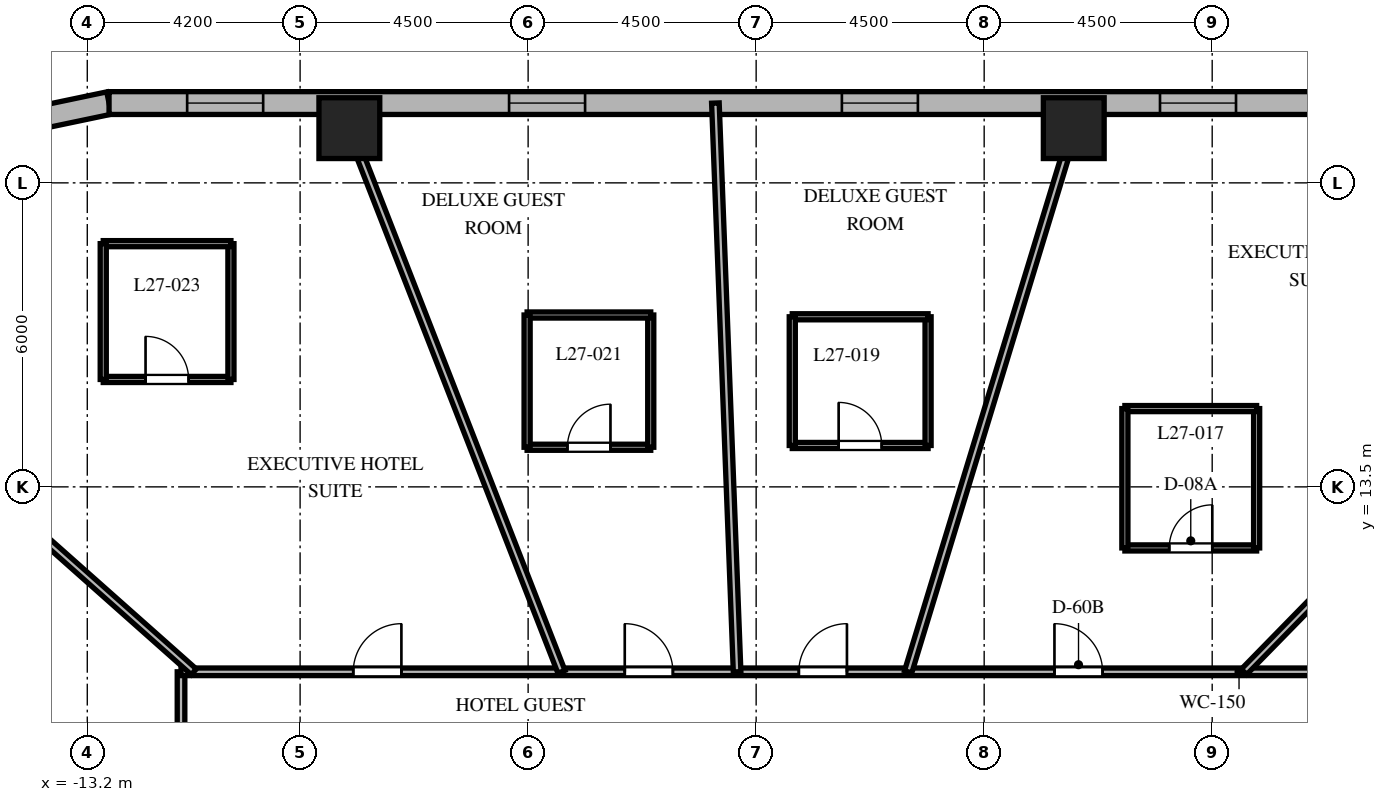
"""IFC4 building model, lengths in metres.
Left out: names, types, materials, properties, quantities, classifications, styles, units other than length and angle.
Written with IfcOpenShell. Run it as: python <this file> out.ifc"""

import sys

from ifc_helpers import new_model, si_unit, direction, frame, frame_2d, origin, origin_2d, place, context, subcontext, project, spatial, rectangle, extrude, element, fill, save


model = new_model("IFC4")
c1 = context("Model", 3, precision=1e-05, world=origin(), true_north=direction((0.0, 1.0)))
c2 = subcontext(c1, "Body", "Model", "MODEL_VIEW")
j1 = project(units=[si_unit("LENGTHUNIT", "METRE"), si_unit("PLANEANGLEUNIT", "RADIAN")], contexts=[c1])
p1 = place(None, origin())
s1 = spatial("IfcSite", under=j1, at=p1, CompositionType="ELEMENT")
p2 = place(p1, origin())
s2 = spatial("IfcBuilding", under=s1, at=p2, CompositionType="ELEMENT")
p3 = place(p2, frame((0.0, 0.0, 113.6)))
s3 = spatial("IfcBuildingStorey", under=s2, at=p3, CompositionType="ELEMENT", Elevation=113.6)
for number, where, z_axis, x_axis in (
    (1, (6.268, 20.58, 0.0), (0.0, 0.0, 1.0), (1.0, 0.0, 0.0)),
    (2, (-8.028, 20.58, 0.0), (0.0, 0.0, 1.0), (1.0, 0.0, 0.0)),
):
    element("IfcColumn", number, at=place(p3, frame(where, z_axis=z_axis, x_axis=x_axis)), inside=s3, PredefinedType="COLUMN", context=c2, shape_type="SweptSolid", body=[
        extrude(rectangle(XDim=1.2, YDim=1.2, at=origin_2d()), origin(), (0.0, 0.0, 1.0), 3.7),
    ])
p4 = place(p3, frame((-12.771, 21.075, 0.0), z_axis=(0.0, 0.0, 1.0), x_axis=(-0.97874281988, -0.205091424819, 0.0)))
e3 = element("IfcWall", 3, at=p4, inside=s3, PredefinedType="SOLIDWALL", context=c2, shape_type="SweptSolid", body=[
    extrude(rectangle(XDim=1.406, YDim=0.45, at=frame_2d((0.703, 0.0))), origin(), (0.0, 0.0, 1.0), 3.4),
])
p5 = place(p3, frame((11.012, 21.075, 0.0), z_axis=(0.0, 0.0, 1.0), x_axis=(-1.0, 0.0, 0.0)))
e4 = element("IfcWall", 4, at=p5, inside=s3, PredefinedType="SOLIDWALL", context=c2, shape_type="SweptSolid", body=[
    extrude(rectangle(XDim=23.782, YDim=0.45, at=frame_2d((11.891, 0.0))), origin(), (0.0, 0.0, 1.0), 3.4),
])
p6 = place(p5, frame((1.542, 0.0, 0.8)))
e5 = element("IfcOpeningElement", 5, at=p6, cuts=e4, PredefinedType="OPENING", context=c2, shape_type="SweptSolid", body=[
    extrude(rectangle(XDim=1.5, YDim=1.8, at=frame_2d((0.75, 0.9))), frame((0.0, 0.235, 0.0), z_axis=(0.0, -1.0, 0.0), x_axis=(1.0, 0.0, 0.0)), (0.0, 0.0, 1.0), 0.47),
])
p7 = place(p5, frame((7.82, 0.0, 0.8)))
e6 = element("IfcOpeningElement", 6, at=p7, cuts=e4, PredefinedType="OPENING", context=c2, shape_type="SweptSolid", body=[
    extrude(rectangle(XDim=1.5, YDim=1.8, at=frame_2d((0.75, 0.9))), frame((0.0, 0.235, 0.0), z_axis=(0.0, -1.0, 0.0), x_axis=(1.0, 0.0, 0.0)), (0.0, 0.0, 1.0), 0.47),
])
p8 = place(p5, frame((14.388, 0.0, 0.8)))
e7 = element("IfcOpeningElement", 7, at=p8, cuts=e4, PredefinedType="OPENING", context=c2, shape_type="SweptSolid", body=[
    extrude(rectangle(XDim=1.5, YDim=1.8, at=frame_2d((0.75, 0.9))), frame((0.0, 0.235, 0.0), z_axis=(0.0, -1.0, 0.0), x_axis=(1.0, 0.0, 0.0)), (0.0, 0.0, 1.0), 0.47),
])
p9 = place(p5, frame((20.741, 0.0, 0.8)))
e8 = element("IfcOpeningElement", 8, at=p9, cuts=e4, PredefinedType="OPENING", context=c2, shape_type="SweptSolid", body=[
    extrude(rectangle(XDim=1.5, YDim=1.8, at=frame_2d((0.75, 0.9))), frame((0.0, 0.235, 0.0), z_axis=(0.0, -1.0, 0.0), x_axis=(1.0, 0.0, 0.0)), (0.0, 0.0, 1.0), 0.47),
])
p10 = place(p3, frame((-11.35, -9.85, 0.0), z_axis=(0.0, 0.0, 1.0), x_axis=(0.0, 1.0, 0.0)))
e9 = element("IfcWall", 9, at=p10, inside=s3, PredefinedType="PARTITIONING", context=c2, shape_type="SweptSolid", body=[
    extrude(rectangle(XDim=19.7, YDim=0.15, at=frame_2d((9.85, 0.0))), origin(), (0.0, 0.0, 1.0), 2.84),
])
p11 = place(p10, frame((17.197, 0.0, 0.0)))
e10 = element("IfcOpeningElement", 10, at=p11, cuts=e9, PredefinedType="OPENING", context=c2, shape_type="SweptSolid", body=[
    extrude(rectangle(XDim=0.9, YDim=2.03, at=frame_2d((0.45, 1.015))), frame((0.0, 0.085, 0.0), z_axis=(0.0, -1.0, 0.0), x_axis=(1.0, 0.0, 0.0)), (0.0, 0.0, 1.0), 0.17),
])
p12 = place(p10, frame((13.408, 0.0, 0.0)))
e11 = element("IfcOpeningElement", 11, at=p12, cuts=e9, PredefinedType="OPENING", context=c2, shape_type="SweptSolid", body=[
    extrude(rectangle(XDim=0.95, YDim=2.03, at=frame_2d((0.475, 1.015))), frame((0.0, 0.085, 0.0), z_axis=(0.0, -1.0, 0.0), x_axis=(1.0, 0.0, 0.0)), (0.0, 0.0, 1.0), 0.17),
])
p13 = place(p10, frame((8.836, 0.0, 0.0)))
e12 = element("IfcOpeningElement", 12, at=p13, cuts=e9, PredefinedType="OPENING", context=c2, shape_type="SweptSolid", body=[
    extrude(rectangle(XDim=0.95, YDim=2.03, at=frame_2d((0.475, 1.015))), frame((0.0, 0.085, 0.0), z_axis=(0.0, -1.0, 0.0), x_axis=(1.0, 0.0, 0.0)), (0.0, 0.0, 1.0), 0.17),
])
p14 = place(p10, frame((4.199, 0.0, 0.0)))
e13 = element("IfcOpeningElement", 13, at=p14, cuts=e9, PredefinedType="OPENING", context=c2, shape_type="SweptSolid", body=[
    extrude(rectangle(XDim=0.95, YDim=2.03, at=frame_2d((0.475, 1.015))), frame((0.0, 0.085, 0.0), z_axis=(0.0, -1.0, 0.0), x_axis=(1.0, 0.0, 0.0)), (0.0, 0.0, 1.0), 0.17),
])
p15 = place(p10, frame((1.002, 0.0, 0.0)))
e14 = element("IfcOpeningElement", 14, at=p15, cuts=e9, PredefinedType="OPENING", context=c2, shape_type="SweptSolid", body=[
    extrude(rectangle(XDim=0.9, YDim=2.03, at=frame_2d((0.45, 1.015))), frame((0.0, 0.085, 0.0), z_axis=(0.0, -1.0, 0.0), x_axis=(1.0, 0.0, 0.0)), (0.0, 0.0, 1.0), 0.17),
])
p16 = place(p3, frame((-11.35, 9.85, 0.0), z_axis=(0.0, 0.0, 1.0), x_axis=(1.0, 0.0, 0.0)))
e15 = element("IfcWall", 15, at=p16, inside=s3, PredefinedType="PARTITIONING", context=c2, shape_type="SweptSolid", body=[
    extrude(rectangle(XDim=22.7, YDim=0.15, at=frame_2d((11.35, 0.0))), origin(), (0.0, 0.0, 1.0), 2.84),
])
p17 = place(p16, frame((17.237, 0.0, 0.0)))
e16 = element("IfcOpeningElement", 16, at=p17, cuts=e15, PredefinedType="OPENING", context=c2, shape_type="SweptSolid", body=[
    extrude(rectangle(XDim=0.95, YDim=2.03, at=frame_2d((0.475, 1.015))), frame((0.0, 0.085, 0.0), z_axis=(0.0, -1.0, 0.0), x_axis=(1.0, 0.0, 0.0)), (0.0, 0.0, 1.0), 0.17),
])
p18 = place(p16, frame((12.192, 0.0, 0.0)))
e17 = element("IfcOpeningElement", 17, at=p18, cuts=e15, PredefinedType="OPENING", context=c2, shape_type="SweptSolid", body=[
    extrude(rectangle(XDim=0.95, YDim=2.03, at=frame_2d((0.475, 1.015))), frame((0.0, 0.085, 0.0), z_axis=(0.0, -1.0, 0.0), x_axis=(1.0, 0.0, 0.0)), (0.0, 0.0, 1.0), 0.17),
])
p19 = place(p16, frame((8.757, 0.0, 0.0)))
e18 = element("IfcOpeningElement", 18, at=p19, cuts=e15, PredefinedType="OPENING", context=c2, shape_type="SweptSolid", body=[
    extrude(rectangle(XDim=0.95, YDim=2.03, at=frame_2d((0.475, 1.015))), frame((0.0, 0.085, 0.0), z_axis=(0.0, -1.0, 0.0), x_axis=(1.0, 0.0, 0.0)), (0.0, 0.0, 1.0), 0.17),
])
p20 = place(p16, frame((3.399, 0.0, 0.0)))
e19 = element("IfcOpeningElement", 19, at=p20, cuts=e15, PredefinedType="OPENING", context=c2, shape_type="SweptSolid", body=[
    extrude(rectangle(XDim=0.95, YDim=2.03, at=frame_2d((0.475, 1.015))), frame((0.0, 0.085, 0.0), z_axis=(0.0, -1.0, 0.0), x_axis=(1.0, 0.0, 0.0)), (0.0, 0.0, 1.0), 0.17),
])
p21 = place(p3, frame((9.628, 9.85, 0.0), z_axis=(0.0, 0.0, 1.0), x_axis=(0.698992824326, 0.715128681805, 0.0)))
e20 = element("IfcWall", 20, at=p21, inside=s3, PredefinedType="PARTITIONING", context=c2, shape_type="SweptSolid", body=[
    extrude(rectangle(XDim=8.579, YDim=0.15, at=frame_2d((4.29, 0.0))), origin(), (0.0, 0.0, 1.0), 2.54),
])
p22 = place(p3, frame((3.0, 9.85, 0.0), z_axis=(0.0, 0.0, 1.0), x_axis=(0.291352035382, 0.95661590593, 0.0)))
e21 = element("IfcWall", 21, at=p22, inside=s3, PredefinedType="PARTITIONING", context=c2, shape_type="SweptSolid", body=[
    extrude(rectangle(XDim=11.734, YDim=0.15, at=frame_2d((5.867, 0.0))), origin(), (0.0, 0.0, 1.0), 2.54),
])
p23 = place(p3, frame((-0.376, 9.85, 0.0), z_axis=(0.0, 0.0, 1.0), x_axis=(-0.03812177869, 0.999273100804, 0.0)))
e22 = element("IfcWall", 22, at=p23, inside=s3, PredefinedType="PARTITIONING", context=c2, shape_type="SweptSolid", body=[
    extrude(rectangle(XDim=11.233, YDim=0.15, at=frame_2d((5.616, 0.0))), origin(), (0.0, 0.0, 1.0), 2.54),
])
p24 = place(p3, frame((-3.842, 9.85, 0.0), z_axis=(0.0, 0.0, 1.0), x_axis=(-0.363432685593, 0.931620460833, 0.0)))
e23 = element("IfcWall", 23, at=p24, inside=s3, PredefinedType="PARTITIONING", context=c2, shape_type="SweptSolid", body=[
    extrude(rectangle(XDim=12.049, YDim=0.15, at=frame_2d((6.024, 0.0))), origin(), (0.0, 0.0, 1.0), 2.54),
])
p25 = place(p3, frame((-11.098, 9.85, 0.0), z_axis=(0.0, 0.0, 1.0), x_axis=(-0.747904295103, 0.663806572253, 0.0)))
e24 = element("IfcWall", 24, at=p25, inside=s3, PredefinedType="PARTITIONING", context=c2, shape_type="SweptSolid", body=[
    extrude(rectangle(XDim=8.16, YDim=0.15, at=frame_2d((4.08, 0.0))), origin(), (0.0, 0.0, 1.0), 2.54),
])
p26 = place(p3, frame((-11.35, 5.983, 0.0), z_axis=(0.0, 0.0, 1.0), x_axis=(-0.884597447182, 0.466355397137, 0.0)))
e25 = element("IfcWall", 25, at=p26, inside=s3, PredefinedType="PARTITIONING", context=c2, shape_type="SweptSolid", body=[
    extrude(rectangle(XDim=8.657, YDim=0.15, at=frame_2d((4.328, 0.0))), origin(), (0.0, 0.0, 1.0), 2.54),
])
p27 = place(p3, frame((7.277, 12.295, 0.0), z_axis=(0.0, 0.0, 1.0), x_axis=(1.0, 0.0, 0.0)))
e26 = element("IfcWall", 26, at=p27, inside=s3, PredefinedType="PARTITIONING", context=c2, shape_type="SweptSolid", body=[
    extrude(rectangle(XDim=2.6, YDim=0.12, at=frame_2d((1.3, 0.0))), origin(), (0.0, 0.0, 1.0), 2.84),
])
p28 = place(p27, frame((0.875, 0.0, 0.0)))
e27 = element("IfcOpeningElement", 27, at=p28, cuts=e26, PredefinedType="OPENING", context=c2, shape_type="SweptSolid", body=[
    extrude(rectangle(XDim=0.85, YDim=2.03, at=frame_2d((0.425, 1.015))), frame((0.0, 0.07, 0.0), z_axis=(0.0, -1.0, 0.0), x_axis=(1.0, 0.0, 0.0)), (0.0, 0.0, 1.0), 0.14),
])
p29 = place(p3, frame((9.877, 12.295, 0.0), z_axis=(0.0, 0.0, 1.0), x_axis=(0.0, 1.0, 0.0)))
e28 = element("IfcWall", 28, at=p29, inside=s3, PredefinedType="PARTITIONING", context=c2, shape_type="SweptSolid", body=[
    extrude(rectangle(XDim=2.75, YDim=0.12, at=frame_2d((1.375, 0.0))), origin(), (0.0, 0.0, 1.0), 2.972),
])
p30 = place(p3, frame((9.877, 15.045, 0.0), z_axis=(0.0, 0.0, 1.0), x_axis=(-1.0, 0.0, 0.0)))
e29 = element("IfcWall", 29, at=p30, inside=s3, PredefinedType="PARTITIONING", context=c2, shape_type="SweptSolid", body=[
    extrude(rectangle(XDim=2.6, YDim=0.12, at=frame_2d((1.3, 0.0))), origin(), (0.0, 0.0, 1.0), 2.972),
])
p31 = place(p3, frame((7.277, 15.045, 0.0), z_axis=(0.0, 0.0, 1.0), x_axis=(0.0, -1.0, 0.0)))
e30 = element("IfcWall", 30, at=p31, inside=s3, PredefinedType="PARTITIONING", context=c2, shape_type="SweptSolid", body=[
    extrude(rectangle(XDim=2.75, YDim=0.12, at=frame_2d((1.375, 0.0))), origin(), (0.0, 0.0, 1.0), 2.84),
])
p32 = place(p3, frame((0.713, 14.317, 0.0), z_axis=(0.0, 0.0, 1.0), x_axis=(1.0, 0.0, 0.0)))
e31 = element("IfcWall", 31, at=p32, inside=s3, PredefinedType="PARTITIONING", context=c2, shape_type="SweptSolid", body=[
    extrude(rectangle(XDim=2.68, YDim=0.12, at=frame_2d((1.34, 0.0))), origin(), (0.0, 0.0, 1.0), 3.4),
])
p33 = place(p32, frame((0.915, 0.0, 0.0)))
e32 = element("IfcOpeningElement", 32, at=p33, cuts=e31, PredefinedType="OPENING", context=c2, shape_type="SweptSolid", body=[
    extrude(rectangle(XDim=0.85, YDim=2.03, at=frame_2d((0.425, 1.015))), frame((0.0, 0.07, 0.0), z_axis=(0.0, -1.0, 0.0), x_axis=(1.0, 0.0, 0.0)), (0.0, 0.0, 1.0), 0.14),
])
p34 = place(p3, frame((3.393, 14.317, 0.0), z_axis=(0.0, 0.0, 1.0), x_axis=(0.0, 1.0, 0.0)))
e33 = element("IfcWall", 33, at=p34, inside=s3, PredefinedType="PARTITIONING", context=c2, shape_type="SweptSolid", body=[
    extrude(rectangle(XDim=2.54, YDim=0.12, at=frame_2d((1.27, 0.0))), origin(), (0.0, 0.0, 1.0), 2.84),
])
p35 = place(p3, frame((3.393, 16.857, 0.0), z_axis=(0.0, 0.0, 1.0), x_axis=(-1.0, 0.0, 0.0)))
e34 = element("IfcWall", 34, at=p35, inside=s3, PredefinedType="PARTITIONING", context=c2, shape_type="SweptSolid", body=[
    extrude(rectangle(XDim=2.68, YDim=0.12, at=frame_2d((1.34, 0.0))), origin(), (0.0, 0.0, 1.0), 3.4),
])
p36 = place(p3, frame((0.713, 16.857, 0.0), z_axis=(0.0, 0.0, 1.0), x_axis=(0.0, -1.0, 0.0)))
e35 = element("IfcWall", 35, at=p36, inside=s3, PredefinedType="PARTITIONING", context=c2, shape_type="SweptSolid", body=[
    extrude(rectangle(XDim=2.54, YDim=0.12, at=frame_2d((1.27, 0.0))), origin(), (0.0, 0.0, 1.0), 2.84),
])
p37 = place(p3, frame((-4.52, 14.282, 0.0), z_axis=(0.0, 0.0, 1.0), x_axis=(1.0, 0.0, 0.0)))
e36 = element("IfcWall", 36, at=p37, inside=s3, PredefinedType="PARTITIONING", context=c2, shape_type="SweptSolid", body=[
    extrude(rectangle(XDim=2.44, YDim=0.12, at=frame_2d((1.22, 0.0))), origin(), (0.0, 0.0, 1.0), 3.4),
])
p38 = place(p37, frame((0.795, 0.0, 0.0)))
e37 = element("IfcOpeningElement", 37, at=p38, cuts=e36, PredefinedType="OPENING", context=c2, shape_type="SweptSolid", body=[
    extrude(rectangle(XDim=0.85, YDim=2.03, at=frame_2d((0.425, 1.015))), frame((0.0, 0.07, 0.0), z_axis=(0.0, -1.0, 0.0), x_axis=(1.0, 0.0, 0.0)), (0.0, 0.0, 1.0), 0.14),
])
p39 = place(p3, frame((-2.08, 14.282, 0.0), z_axis=(0.0, 0.0, 1.0), x_axis=(0.0, 1.0, 0.0)))
e38 = element("IfcWall", 38, at=p39, inside=s3, PredefinedType="PARTITIONING", context=c2, shape_type="SweptSolid", body=[
    extrude(rectangle(XDim=2.61, YDim=0.12, at=frame_2d((1.305, 0.0))), origin(), (0.0, 0.0, 1.0), 2.84),
])
p40 = place(p3, frame((-2.08, 16.892, 0.0), z_axis=(0.0, 0.0, 1.0), x_axis=(-1.0, 0.0, 0.0)))
e39 = element("IfcWall", 39, at=p40, inside=s3, PredefinedType="PARTITIONING", context=c2, shape_type="SweptSolid", body=[
    extrude(rectangle(XDim=2.44, YDim=0.12, at=frame_2d((1.22, 0.0))), origin(), (0.0, 0.0, 1.0), 3.4),
])
p41 = place(p3, frame((-4.52, 16.892, 0.0), z_axis=(0.0, 0.0, 1.0), x_axis=(0.0, -1.0, 0.0)))
e40 = element("IfcWall", 40, at=p41, inside=s3, PredefinedType="PARTITIONING", context=c2, shape_type="SweptSolid", body=[
    extrude(rectangle(XDim=2.61, YDim=0.12, at=frame_2d((1.305, 0.0))), origin(), (0.0, 0.0, 1.0), 2.84),
])
p42 = place(p3, frame((-12.885, 15.62, 0.0), z_axis=(0.0, 0.0, 1.0), x_axis=(1.0, 0.0, 0.0)))
e41 = element("IfcWall", 41, at=p42, inside=s3, PredefinedType="PARTITIONING", context=c2, shape_type="SweptSolid", body=[
    extrude(rectangle(XDim=2.52, YDim=0.12, at=frame_2d((1.26, 0.0))), origin(), (0.0, 0.0, 1.0), 3.4),
])
p43 = place(p42, frame((0.835, 0.0, 0.0)))
e42 = element("IfcOpeningElement", 42, at=p43, cuts=e41, PredefinedType="OPENING", context=c2, shape_type="SweptSolid", body=[
    extrude(rectangle(XDim=0.85, YDim=2.03, at=frame_2d((0.425, 1.015))), frame((0.0, 0.07, 0.0), z_axis=(0.0, -1.0, 0.0), x_axis=(1.0, 0.0, 0.0)), (0.0, 0.0, 1.0), 0.14),
])
p44 = place(p3, frame((-10.365, 15.62, 0.0), z_axis=(0.0, 0.0, 1.0), x_axis=(0.0, 1.0, 0.0)))
e43 = element("IfcWall", 43, at=p44, inside=s3, PredefinedType="PARTITIONING", context=c2, shape_type="SweptSolid", body=[
    extrude(rectangle(XDim=2.68, YDim=0.12, at=frame_2d((1.34, 0.0))), origin(), (0.0, 0.0, 1.0), 3.4),
])
p45 = place(p3, frame((-10.365, 18.3, 0.0), z_axis=(0.0, 0.0, 1.0), x_axis=(-1.0, 0.0, 0.0)))
e44 = element("IfcWall", 44, at=p45, inside=s3, PredefinedType="PARTITIONING", context=c2, shape_type="SweptSolid", body=[
    extrude(rectangle(XDim=2.52, YDim=0.12, at=frame_2d((1.26, 0.0))), origin(), (0.0, 0.0, 1.0), 2.54),
])
p46 = place(p3, frame((-12.885, 18.3, 0.0), z_axis=(0.0, 0.0, 1.0), x_axis=(0.0, -1.0, 0.0)))
e45 = element("IfcWall", 45, at=p46, inside=s3, PredefinedType="PARTITIONING", context=c2, shape_type="SweptSolid", body=[
    extrude(rectangle(XDim=2.68, YDim=0.12, at=frame_2d((1.34, 0.0))), origin(), (0.0, 0.0, 1.0), 2.54),
])
p47 = place(p6, origin())
e46 = element("IfcWindow", 46, at=p47, inside=s3, PartitioningType="SINGLE_PANEL", PredefinedType="WINDOW", context=c2, shape_type="SweptSolid", body=[
    extrude(rectangle(XDim=1.5, YDim=1.8, at=frame_2d((0.75, 0.9))), frame((0.0, 0.03, 0.0), z_axis=(0.0, -1.0, 0.0), x_axis=(1.0, 0.0, 0.0)), (0.0, 0.0, 1.0), 0.06),
])
fill(e5, e46)
p48 = place(p7, origin())
e47 = element("IfcWindow", 47, at=p48, inside=s3, PartitioningType="SINGLE_PANEL", PredefinedType="WINDOW", context=c2, shape_type="SweptSolid", body=[
    extrude(rectangle(XDim=1.5, YDim=1.8, at=frame_2d((0.75, 0.9))), frame((0.0, 0.03, 0.0), z_axis=(0.0, -1.0, 0.0), x_axis=(1.0, 0.0, 0.0)), (0.0, 0.0, 1.0), 0.06),
])
fill(e6, e47)
p49 = place(p8, origin())
e48 = element("IfcWindow", 48, at=p49, inside=s3, PartitioningType="SINGLE_PANEL", PredefinedType="WINDOW", context=c2, shape_type="SweptSolid", body=[
    extrude(rectangle(XDim=1.5, YDim=1.8, at=frame_2d((0.75, 0.9))), frame((0.0, 0.03, 0.0), z_axis=(0.0, -1.0, 0.0), x_axis=(1.0, 0.0, 0.0)), (0.0, 0.0, 1.0), 0.06),
])
fill(e7, e48)
p50 = place(p9, origin())
e49 = element("IfcWindow", 49, at=p50, inside=s3, PartitioningType="SINGLE_PANEL", PredefinedType="WINDOW", context=c2, shape_type="SweptSolid", body=[
    extrude(rectangle(XDim=1.5, YDim=1.8, at=frame_2d((0.75, 0.9))), frame((0.0, 0.03, 0.0), z_axis=(0.0, -1.0, 0.0), x_axis=(1.0, 0.0, 0.0)), (0.0, 0.0, 1.0), 0.06),
])
fill(e8, e49)
p51 = place(p17, origin())
e50 = element("IfcDoor", 50, at=p51, inside=s3, OperationType="SINGLE_SWING_LEFT", PredefinedType="DOOR", context=c2, shape_type="SweptSolid", body=[
    extrude(rectangle(XDim=0.95, YDim=2.03, at=frame_2d((0.475, 1.015))), frame((0.0, 0.025, 0.0), z_axis=(0.0, -1.0, 0.0), x_axis=(1.0, 0.0, 0.0)), (0.0, 0.0, 1.0), 0.05),
])
fill(e16, e50)
p52 = place(p28, origin())
e51 = element("IfcDoor", 51, at=p52, inside=s3, OperationType="SINGLE_SWING_RIGHT", PredefinedType="DOOR", context=c2, shape_type="SweptSolid", body=[
    extrude(rectangle(XDim=0.85, YDim=2.03, at=frame_2d((0.425, 1.015))), frame((0.0, 0.025, 0.0), z_axis=(0.0, -1.0, 0.0), x_axis=(1.0, 0.0, 0.0)), (0.0, 0.0, 1.0), 0.05),
])
fill(e27, e51)
p53 = place(p18, origin())
e52 = element("IfcDoor", 52, at=p53, inside=s3, OperationType="SINGLE_SWING_RIGHT", PredefinedType="DOOR", context=c2, shape_type="SweptSolid", body=[
    extrude(rectangle(XDim=0.95, YDim=2.03, at=frame_2d((0.475, 1.015))), frame((0.0, 0.025, 0.0), z_axis=(0.0, -1.0, 0.0), x_axis=(1.0, 0.0, 0.0)), (0.0, 0.0, 1.0), 0.05),
])
fill(e17, e52)
p54 = place(p33, origin())
e53 = element("IfcDoor", 53, at=p54, inside=s3, OperationType="SINGLE_SWING_LEFT", PredefinedType="DOOR", context=c2, shape_type="SweptSolid", body=[
    extrude(rectangle(XDim=0.85, YDim=2.03, at=frame_2d((0.425, 1.015))), frame((0.0, 0.025, 0.0), z_axis=(0.0, -1.0, 0.0), x_axis=(1.0, 0.0, 0.0)), (0.0, 0.0, 1.0), 0.05),
])
fill(e32, e53)
p55 = place(p19, origin())
e54 = element("IfcDoor", 54, at=p55, inside=s3, OperationType="SINGLE_SWING_LEFT", PredefinedType="DOOR", context=c2, shape_type="SweptSolid", body=[
    extrude(rectangle(XDim=0.95, YDim=2.03, at=frame_2d((0.475, 1.015))), frame((0.0, 0.025, 0.0), z_axis=(0.0, -1.0, 0.0), x_axis=(1.0, 0.0, 0.0)), (0.0, 0.0, 1.0), 0.05),
])
fill(e18, e54)
p56 = place(p38, origin())
e55 = element("IfcDoor", 55, at=p56, inside=s3, OperationType="SINGLE_SWING_RIGHT", PredefinedType="DOOR", context=c2, shape_type="SweptSolid", body=[
    extrude(rectangle(XDim=0.85, YDim=2.03, at=frame_2d((0.425, 1.015))), frame((0.0, 0.025, 0.0), z_axis=(0.0, -1.0, 0.0), x_axis=(1.0, 0.0, 0.0)), (0.0, 0.0, 1.0), 0.05),
])
fill(e37, e55)
p57 = place(p20, origin())
e56 = element("IfcDoor", 56, at=p57, inside=s3, OperationType="SINGLE_SWING_RIGHT", PredefinedType="DOOR", context=c2, shape_type="SweptSolid", body=[
    extrude(rectangle(XDim=0.95, YDim=2.03, at=frame_2d((0.475, 1.015))), frame((0.0, 0.025, 0.0), z_axis=(0.0, -1.0, 0.0), x_axis=(1.0, 0.0, 0.0)), (0.0, 0.0, 1.0), 0.05),
])
fill(e19, e56)
p58 = place(p43, origin())
e57 = element("IfcDoor", 57, at=p58, inside=s3, OperationType="SINGLE_SWING_LEFT", PredefinedType="DOOR", context=c2, shape_type="SweptSolid", body=[
    extrude(rectangle(XDim=0.85, YDim=2.03, at=frame_2d((0.425, 1.015))), frame((0.0, 0.025, 0.0), z_axis=(0.0, -1.0, 0.0), x_axis=(1.0, 0.0, 0.0)), (0.0, 0.0, 1.0), 0.05),
])
fill(e42, e57)
save(model, sys.argv[1])
